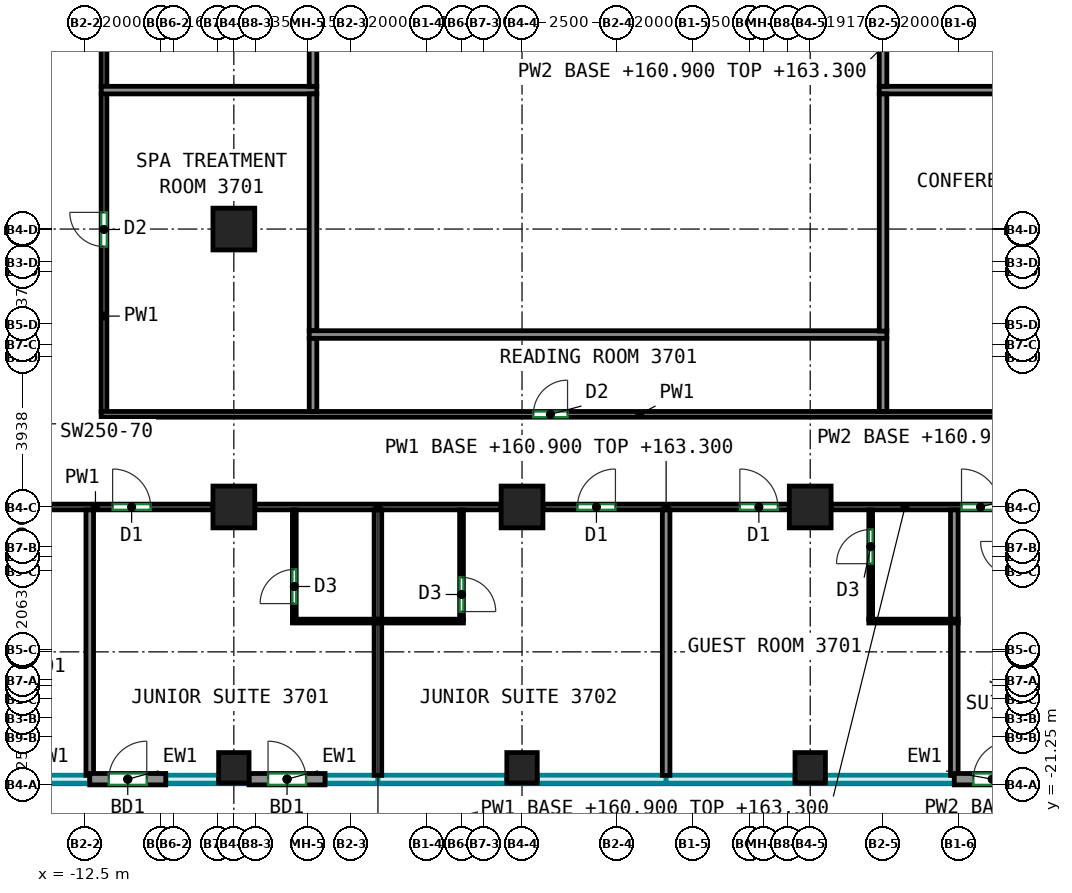
"""IFC4 building model, lengths in metres.
Left out: names, types, materials, properties, quantities, classifications, styles, units other than length and angle.
Written with IfcOpenShell. Run it as: python <this file> out.ifc"""

import sys

from ifc_helpers import new_model, si_unit, direction, frame, frame_2d, origin, origin_2d, place, context, subcontext, project, spatial, rectangle, extrude, source, transform, mapped, element, fill, save


model = new_model("IFC4")
c1 = context("Model", 3, precision=1e-05, world=origin(), true_north=direction((0.0, 1.0)))
c2 = subcontext(c1, "Body", "Model", "MODEL_VIEW")
j1 = project(units=[si_unit("LENGTHUNIT", "METRE"), si_unit("PLANEANGLEUNIT", "RADIAN")], contexts=[c1])
p1 = place(None, origin())
s1 = spatial("IfcSite", under=j1, at=p1, CompositionType="ELEMENT")
p2 = place(p1, origin())
s2 = spatial("IfcBuilding", under=s1, at=p2, CompositionType="ELEMENT")
p3 = place(p2, frame((0.0, 0.0, 160.9)))
s3 = spatial("IfcBuildingStorey", under=s2, at=p3, CompositionType="ELEMENT", Elevation=160.9)
m1 = source(origin(), c2, "Body", "SweptSolid", [
    extrude(rectangle(XDim=0.8, YDim=0.8, at=origin_2d()), origin(), (0.0, 0.0, 1.0), 3.0),
])
p4 = place(p3, frame((-8.583, -20.8, 0.0), z_axis=(0.0, 0.0, 1.0), x_axis=(1.0, 0.0, 0.0)))
e1 = element("IfcColumn", 1, at=p4, inside=s3, PredefinedType="COLUMN", context=c2, shape_type="MappedRepresentation", body=[
    mapped(m1, transform((0.0, 0.0, 0.0))),
])
m2 = source(origin(), c2, "Body", "SweptSolid", [
    extrude(rectangle(XDim=1.1, YDim=1.1, at=origin_2d()), origin(), (0.0, 0.0, 1.0), 3.0),
])
for number, where, z_axis, x_axis in (
    (2, (-8.583, -13.938, 0.0), (0.0, 0.0, 1.0), (1.0, 0.0, 0.0)),
    (3, (-8.583, -6.625, 0.0), (0.0, 0.0, 1.0), (1.0, 0.0, 0.0)),
):
    element("IfcColumn", number, at=place(p3, frame(where, z_axis=z_axis, x_axis=x_axis)), inside=s3, PredefinedType="COLUMN", context=c2, shape_type="MappedRepresentation", body=[
        mapped(m2, transform((0.0, 0.0, 0.0))),
    ])
p5 = place(p3, frame((-1.0, -20.8, 0.0), z_axis=(0.0, 0.0, 1.0), x_axis=(1.0, 0.0, 0.0)))
e4 = element("IfcColumn", 4, at=p5, inside=s3, PredefinedType="COLUMN", context=c2, shape_type="MappedRepresentation", body=[
    mapped(m1, transform((0.0, 0.0, 0.0))),
])
p6 = place(p3, frame((-1.0, -13.938, 0.0), z_axis=(0.0, 0.0, 1.0), x_axis=(1.0, 0.0, 0.0)))
e5 = element("IfcColumn", 5, at=p6, inside=s3, PredefinedType="COLUMN", context=c2, shape_type="MappedRepresentation", body=[
    mapped(m2, transform((0.0, 0.0, 0.0))),
])
p7 = place(p3, frame((6.583, -20.8, 0.0), z_axis=(0.0, 0.0, 1.0), x_axis=(1.0, 0.0, 0.0)))
e6 = element("IfcColumn", 6, at=p7, inside=s3, PredefinedType="COLUMN", context=c2, shape_type="MappedRepresentation", body=[
    mapped(m1, transform((0.0, 0.0, 0.0))),
])
p8 = place(p3, frame((6.583, -13.938, 0.0), z_axis=(0.0, 0.0, 1.0), x_axis=(1.0, 0.0, 0.0)))
e7 = element("IfcColumn", 7, at=p8, inside=s3, PredefinedType="COLUMN", context=c2, shape_type="MappedRepresentation", body=[
    mapped(m2, transform((0.0, 0.0, 0.0))),
])
m3 = source(origin(), c2, "Body", "SweptSolid", [
    extrude(rectangle(XDim=2.0, YDim=0.3, at=frame_2d((1.0, 0.0))), origin(), (0.0, 0.0, 1.0), 3.0),
])
p9 = place(p3, frame((-12.375, -21.1, 0.0), z_axis=(0.0, 0.0, 1.0), x_axis=(1.0, 0.0, 0.0)))
e8 = element("IfcWall", 8, at=p9, inside=s3, PredefinedType="SOLIDWALL", context=c2, shape_type="MappedRepresentation", body=[
    mapped(m3, transform((0.0, 0.0, 0.0))),
])
p10 = place(p9, frame((0.5, 0.0, 0.0)))
e9 = element("IfcOpeningElement", 9, at=p10, cuts=e8, PredefinedType="OPENING", context=c2, shape_type="SweptSolid", body=[
    extrude(rectangle(XDim=1.0, YDim=2.1, at=frame_2d((0.5, 1.05))), frame((0.0, 0.16, 0.0), z_axis=(0.0, -1.0, 0.0), x_axis=(1.0, 0.0, 0.0)), (0.0, 0.0, 1.0), 0.32),
])
p11 = place(p3, frame((-8.183, -21.1, 0.0), z_axis=(0.0, 0.0, 1.0), x_axis=(1.0, 0.0, 0.0)))
e10 = element("IfcWall", 10, at=p11, inside=s3, PredefinedType="SOLIDWALL", context=c2, shape_type="MappedRepresentation", body=[
    mapped(m3, transform((0.0, 0.0, 0.0))),
])
p12 = place(p11, frame((0.5, 0.0, 0.0)))
e11 = element("IfcOpeningElement", 11, at=p12, cuts=e10, PredefinedType="OPENING", context=c2, shape_type="SweptSolid", body=[
    extrude(rectangle(XDim=1.0, YDim=2.1, at=frame_2d((0.5, 1.05))), frame((0.0, 0.16, 0.0), z_axis=(0.0, -1.0, 0.0), x_axis=(1.0, 0.0, 0.0)), (0.0, 0.0, 1.0), 0.32),
])
p13 = place(p3, frame((10.375, -21.1, 0.0), z_axis=(0.0, 0.0, 1.0), x_axis=(1.0, 0.0, 0.0)))
e12 = element("IfcWall", 12, at=p13, inside=s3, PredefinedType="SOLIDWALL", context=c2, shape_type="MappedRepresentation", body=[
    mapped(m3, transform((0.0, 0.0, 0.0))),
])
p14 = place(p13, frame((0.5, 0.0, 0.0)))
e13 = element("IfcOpeningElement", 13, at=p14, cuts=e12, PredefinedType="OPENING", context=c2, shape_type="SweptSolid", body=[
    extrude(rectangle(XDim=1.0, YDim=2.1, at=frame_2d((0.5, 1.05))), frame((0.0, 0.16, 0.0), z_axis=(0.0, -1.0, 0.0), x_axis=(1.0, 0.0, 0.0)), (0.0, 0.0, 1.0), 0.32),
])
p15 = place(p3, frame((-13.55, -13.938, 0.0), z_axis=(0.0, 0.0, 1.0), x_axis=(1.0, 0.0, 0.0)))
e14 = element("IfcWall", 14, at=p15, inside=s3, PredefinedType="PARTITIONING", context=c2, shape_type="SweptSolid", body=[
    extrude(rectangle(XDim=4.417, YDim=0.15, at=frame_2d((2.208, 0.0))), origin(), (0.0, 0.0, 1.0), 3.0),
])
p16 = place(p15, frame((1.777, 0.0, 0.0)))
e15 = element("IfcOpeningElement", 15, at=p16, cuts=e14, PredefinedType="OPENING", context=c2, shape_type="SweptSolid", body=[
    extrude(rectangle(XDim=1.0, YDim=2.1, at=frame_2d((0.5, 1.05))), frame((0.0, 0.085, 0.0), z_axis=(0.0, -1.0, 0.0), x_axis=(1.0, 0.0, 0.0)), (0.0, 0.0, 1.0), 0.17),
])
p17 = place(p3, frame((-8.033, -13.938, 0.0), z_axis=(0.0, 0.0, 1.0), x_axis=(1.0, 0.0, 0.0)))
e16 = element("IfcWall", 16, at=p17, inside=s3, PredefinedType="PARTITIONING", context=c2, shape_type="SweptSolid", body=[
    extrude(rectangle(XDim=6.483, YDim=0.15, at=frame_2d((3.241, 0.0))), origin(), (0.0, 0.0, 1.0), 2.4),
])
p18 = place(p3, frame((-0.45, -13.938, 0.0), z_axis=(0.0, 0.0, 1.0), x_axis=(1.0, 0.0, 0.0)))
e17 = element("IfcWall", 17, at=p18, inside=s3, PredefinedType="PARTITIONING", context=c2, shape_type="SweptSolid", body=[
    extrude(rectangle(XDim=6.483, YDim=0.15, at=frame_2d((3.241, 0.0))), origin(), (0.0, 0.0, 1.0), 2.4),
])
p19 = place(p18, frame((0.908, 0.0, 0.0)))
e18 = element("IfcOpeningElement", 18, at=p19, cuts=e17, PredefinedType="OPENING", context=c2, shape_type="SweptSolid", body=[
    extrude(rectangle(XDim=1.0, YDim=2.1, at=frame_2d((0.5, 1.05))), frame((0.0, 0.085, 0.0), z_axis=(0.0, -1.0, 0.0), x_axis=(1.0, 0.0, 0.0)), (0.0, 0.0, 1.0), 0.17),
])
p20 = place(p18, frame((5.182, 0.0, 0.0)))
e19 = element("IfcOpeningElement", 19, at=p20, cuts=e17, PredefinedType="OPENING", context=c2, shape_type="SweptSolid", body=[
    extrude(rectangle(XDim=1.0, YDim=2.1, at=frame_2d((0.5, 1.05))), frame((0.0, 0.085, 0.0), z_axis=(0.0, -1.0, 0.0), x_axis=(1.0, 0.0, 0.0)), (0.0, 0.0, 1.0), 0.17),
])
p21 = place(p3, frame((7.133, -13.938, 0.0), z_axis=(0.0, 0.0, 1.0), x_axis=(1.0, 0.0, 0.0)))
e20 = element("IfcWall", 20, at=p21, inside=s3, PredefinedType="PARTITIONING", context=c2, shape_type="SweptSolid", body=[
    extrude(rectangle(XDim=6.484, YDim=0.15, at=frame_2d((3.242, 0.0))), origin(), (0.0, 0.0, 1.0), 2.4),
])
p22 = place(p21, frame((3.432, 0.0, 0.0)))
e21 = element("IfcOpeningElement", 21, at=p22, cuts=e20, PredefinedType="OPENING", context=c2, shape_type="SweptSolid", body=[
    extrude(rectangle(XDim=1.0, YDim=2.1, at=frame_2d((0.5, 1.05))), frame((0.0, 0.085, 0.0), z_axis=(0.0, -1.0, 0.0), x_axis=(1.0, 0.0, 0.0)), (0.0, 0.0, 1.0), 0.17),
])
p23 = place(p3, frame((-12.0, -11.425, 0.0), z_axis=(0.0, 0.0, 1.0), x_axis=(0.0, 1.0, 0.0)))
e22 = element("IfcWall", 22, at=p23, inside=s3, PredefinedType="PARTITIONING", context=c2, shape_type="SweptSolid", body=[
    extrude(rectangle(XDim=8.366, YDim=0.15, at=frame_2d((4.183, 0.0))), origin(), (0.0, 0.0, 1.0), 3.0),
])
p24 = place(p23, frame((4.339, 0.0, 0.0)))
e23 = element("IfcOpeningElement", 23, at=p24, cuts=e22, PredefinedType="OPENING", context=c2, shape_type="SweptSolid", body=[
    extrude(rectangle(XDim=0.9, YDim=2.1, at=frame_2d((0.45, 1.05))), frame((0.0, 0.085, 0.0), z_axis=(0.0, -1.0, 0.0), x_axis=(1.0, 0.0, 0.0)), (0.0, 0.0, 1.0), 0.17),
])
p25 = place(p3, frame((-12.075, -11.5, 0.0), z_axis=(0.0, 0.0, 1.0), x_axis=(1.0, 0.0, 0.0)))
e24 = element("IfcWall", 24, at=p25, inside=s3, PredefinedType="PARTITIONING", context=c2, shape_type="SweptSolid", body=[
    extrude(rectangle(XDim=28.35, YDim=0.15, at=frame_2d((14.175, 0.0))), origin(), (0.0, 0.0, 1.0), 3.0),
])
p26 = place(p25, frame((11.373, 0.0, 0.0)))
e25 = element("IfcOpeningElement", 25, at=p26, cuts=e24, PredefinedType="OPENING", context=c2, shape_type="SweptSolid", body=[
    extrude(rectangle(XDim=0.9, YDim=2.1, at=frame_2d((0.45, 1.05))), frame((0.0, 0.085, 0.0), z_axis=(0.0, -1.0, 0.0), x_axis=(1.0, 0.0, 0.0)), (0.0, 0.0, 1.0), 0.17),
])
p27 = place(p3, frame((-12.0, -2.879, 0.0), z_axis=(0.0, 0.0, 1.0), x_axis=(0.0, 1.0, 0.0)))
e26 = element("IfcWall", 26, at=p27, inside=s3, PredefinedType="PARTITIONING", context=c2, shape_type="SweptSolid", body=[
    extrude(rectangle(XDim=6.004, YDim=0.15, at=frame_2d((3.002, 0.0))), origin(), (0.0, 0.0, 1.0), 3.0),
])
p28 = place(p27, frame((3.102, 0.0, 0.0)))
e27 = element("IfcOpeningElement", 27, at=p28, cuts=e26, PredefinedType="OPENING", context=c2, shape_type="SweptSolid", body=[
    extrude(rectangle(XDim=0.9, YDim=2.1, at=frame_2d((0.45, 1.05))), frame((0.0, 0.085, 0.0), z_axis=(0.0, -1.0, 0.0), x_axis=(1.0, 0.0, 0.0)), (0.0, 0.0, 1.0), 0.17),
])
p29 = place(p3, frame((-12.375, -21.0, 0.0), z_axis=(0.0, 0.0, 1.0), x_axis=(0.0, 1.0, 0.0)))
e28 = element("IfcWall", 28, at=p29, inside=s3, PredefinedType="PARTITIONING", context=c2, shape_type="SweptSolid", body=[
    extrude(rectangle(XDim=6.985, YDim=0.2, at=frame_2d((3.493, 0.0))), origin(), (0.0, 0.0, 1.0), 3.0),
])
p30 = place(p3, frame((-6.992, -16.89, 0.0), z_axis=(0.0, 0.0, 1.0), x_axis=(0.0, 1.0, 0.0)))
e29 = element("IfcWall", 29, at=p30, inside=s3, PredefinedType="PARTITIONING", context=c2, shape_type="SweptSolid", body=[
    extrude(rectangle(XDim=2.875, YDim=0.1, at=frame_2d((1.438, 0.0))), origin(), (0.0, 0.0, 1.0), 3.0),
])
p31 = place(p30, frame((0.41, 0.0, 0.0)))
e30 = element("IfcOpeningElement", 30, at=p31, cuts=e29, PredefinedType="OPENING", context=c2, shape_type="SweptSolid", body=[
    extrude(rectangle(XDim=0.9, YDim=2.1, at=frame_2d((0.45, 1.05))), frame((0.0, 0.06, 0.0), z_axis=(0.0, -1.0, 0.0), x_axis=(1.0, 0.0, 0.0)), (0.0, 0.0, 1.0), 0.12),
])
p32 = place(p3, frame((-7.042, -16.94, 0.0), z_axis=(0.0, 0.0, 1.0), x_axis=(1.0, 0.0, 0.0)))
e31 = element("IfcWall", 31, at=p32, inside=s3, PredefinedType="PARTITIONING", context=c2, shape_type="SweptSolid", body=[
    extrude(rectangle(XDim=4.5, YDim=0.1, at=frame_2d((2.25, 0.0))), origin(), (0.0, 0.0, 1.0), 3.0),
])
p33 = place(p3, frame((-4.792, -21.0, 0.0), z_axis=(0.0, 0.0, 1.0), x_axis=(0.0, 1.0, 0.0)))
e32 = element("IfcWall", 32, at=p33, inside=s3, PredefinedType="PARTITIONING", context=c2, shape_type="SweptSolid", body=[
    extrude(rectangle(XDim=4.01, YDim=0.2, at=frame_2d((2.005, 0.0))), origin(), (0.0, 0.0, 1.0), 3.0),
])
p34 = place(p3, frame((-4.792, -16.89, 0.0), z_axis=(0.0, 0.0, 1.0), x_axis=(0.0, 1.0, 0.0)))
e33 = element("IfcWall", 33, at=p34, inside=s3, PredefinedType="PARTITIONING", context=c2, shape_type="SweptSolid", body=[
    extrude(rectangle(XDim=2.875, YDim=0.2, at=frame_2d((1.438, 0.0))), origin(), (0.0, 0.0, 1.0), 3.0),
])
p35 = place(p3, frame((-2.592, -14.015, 0.0), z_axis=(0.0, 0.0, 1.0), x_axis=(0.0, -1.0, 0.0)))
e34 = element("IfcWall", 34, at=p35, inside=s3, PredefinedType="PARTITIONING", context=c2, shape_type="SweptSolid", body=[
    extrude(rectangle(XDim=2.875, YDim=0.1, at=frame_2d((1.438, 0.0))), origin(), (0.0, 0.0, 1.0), 3.0),
])
p36 = place(p35, frame((1.775, 0.0, 0.0)))
e35 = element("IfcOpeningElement", 35, at=p36, cuts=e34, PredefinedType="OPENING", context=c2, shape_type="SweptSolid", body=[
    extrude(rectangle(XDim=0.9, YDim=2.1, at=frame_2d((0.45, 1.05))), frame((0.0, 0.06, 0.0), z_axis=(0.0, -1.0, 0.0), x_axis=(1.0, 0.0, 0.0)), (0.0, 0.0, 1.0), 0.12),
])
p37 = place(p3, frame((2.792, -21.0, 0.0), z_axis=(0.0, 0.0, 1.0), x_axis=(0.0, 1.0, 0.0)))
e36 = element("IfcWall", 36, at=p37, inside=s3, PredefinedType="PARTITIONING", context=c2, shape_type="SweptSolid", body=[
    extrude(rectangle(XDim=6.985, YDim=0.2, at=frame_2d((3.493, 0.0))), origin(), (0.0, 0.0, 1.0), 3.0),
])
p38 = place(p3, frame((8.175, -16.89, 0.0), z_axis=(0.0, 0.0, 1.0), x_axis=(0.0, 1.0, 0.0)))
e37 = element("IfcWall", 37, at=p38, inside=s3, PredefinedType="PARTITIONING", context=c2, shape_type="SweptSolid", body=[
    extrude(rectangle(XDim=2.875, YDim=0.1, at=frame_2d((1.438, 0.0))), origin(), (0.0, 0.0, 1.0), 3.0),
])
p39 = place(p38, frame((1.46, 0.0, 0.0)))
e38 = element("IfcOpeningElement", 38, at=p39, cuts=e37, PredefinedType="OPENING", context=c2, shape_type="SweptSolid", body=[
    extrude(rectangle(XDim=0.9, YDim=2.1, at=frame_2d((0.45, 1.05))), frame((0.0, 0.06, 0.0), z_axis=(0.0, -1.0, 0.0), x_axis=(1.0, 0.0, 0.0)), (0.0, 0.0, 1.0), 0.12),
])
p40 = place(p3, frame((8.125, -16.94, 0.0), z_axis=(0.0, 0.0, 1.0), x_axis=(1.0, 0.0, 0.0)))
e39 = element("IfcWall", 39, at=p40, inside=s3, PredefinedType="PARTITIONING", context=c2, shape_type="SweptSolid", body=[
    extrude(rectangle(XDim=2.35, YDim=0.1, at=frame_2d((1.175, 0.0))), origin(), (0.0, 0.0, 1.0), 3.0),
])
p41 = place(p3, frame((10.375, -21.0, 0.0), z_axis=(0.0, 0.0, 1.0), x_axis=(0.0, 1.0, 0.0)))
e40 = element("IfcWall", 40, at=p41, inside=s3, PredefinedType="PARTITIONING", context=c2, shape_type="SweptSolid", body=[
    extrude(rectangle(XDim=4.01, YDim=0.2, at=frame_2d((2.005, 0.0))), origin(), (0.0, 0.0, 1.0), 3.0),
])
p42 = place(p3, frame((10.375, -16.89, 0.0), z_axis=(0.0, 0.0, 1.0), x_axis=(0.0, 1.0, 0.0)))
e41 = element("IfcWall", 41, at=p42, inside=s3, PredefinedType="PARTITIONING", context=c2, shape_type="SweptSolid", body=[
    extrude(rectangle(XDim=2.875, YDim=0.2, at=frame_2d((1.438, 0.0))), origin(), (0.0, 0.0, 1.0), 3.0),
])
p43 = place(p3, frame((-12.073, -2.969, 0.0), z_axis=(0.0, 0.0, 1.0), x_axis=(1.0, 0.0, 0.0)))
e42 = element("IfcWall", 42, at=p43, inside=s3, PredefinedType="PARTITIONING", context=c2, shape_type="SweptSolid", body=[
    extrude(rectangle(XDim=5.673, YDim=0.2, at=frame_2d((2.836, 0.0))), origin(), (0.0, 0.0, 1.0), 3.0),
])
p44 = place(p3, frame((-6.5, -11.423, 0.0), z_axis=(0.0, 0.0, 1.0), x_axis=(0.0, 1.0, 0.0)))
e43 = element("IfcWall", 43, at=p44, inside=s3, PredefinedType="PARTITIONING", context=c2, shape_type="SweptSolid", body=[
    extrude(rectangle(XDim=1.923, YDim=0.2, at=frame_2d((0.961, 0.0))), origin(), (0.0, 0.0, 1.0), 3.0),
])
p45 = place(p3, frame((-6.5, -9.3, 0.0), z_axis=(0.0, 0.0, 1.0), x_axis=(0.0, 1.0, 0.0)))
e44 = element("IfcWall", 44, at=p45, inside=s3, PredefinedType="PARTITIONING", context=c2, shape_type="SweptSolid", body=[
    extrude(rectangle(XDim=6.231, YDim=0.2, at=frame_2d((3.115, 0.0))), origin(), (0.0, 0.0, 1.0), 3.0),
])
p46 = place(p3, frame((-6.5, -2.869, 0.0), z_axis=(0.0, 0.0, 1.0), x_axis=(0.0, 1.0, 0.0)))
e45 = element("IfcWall", 45, at=p46, inside=s3, PredefinedType="PARTITIONING", context=c2, shape_type="SweptSolid", body=[
    extrude(rectangle(XDim=5.992, YDim=0.2, at=frame_2d((2.996, 0.0))), origin(), (0.0, 0.0, 1.0), 3.0),
])
p47 = place(p3, frame((8.5, -11.423, 0.0), z_axis=(0.0, 0.0, 1.0), x_axis=(0.0, 1.0, 0.0)))
e46 = element("IfcWall", 46, at=p47, inside=s3, PredefinedType="PARTITIONING", context=c2, shape_type="SweptSolid", body=[
    extrude(rectangle(XDim=1.923, YDim=0.2, at=frame_2d((0.961, 0.0))), origin(), (0.0, 0.0, 1.0), 3.0),
])
p48 = place(p3, frame((8.6, -9.4, 0.0), z_axis=(0.0, 0.0, 1.0), x_axis=(-1.0, 0.0, 0.0)))
e47 = element("IfcWall", 47, at=p48, inside=s3, PredefinedType="PARTITIONING", context=c2, shape_type="SweptSolid", body=[
    extrude(rectangle(XDim=15.2, YDim=0.2, at=frame_2d((7.6, 0.0))), origin(), (0.0, 0.0, 1.0), 3.0),
])
p49 = place(p3, frame((8.4, -2.969, 0.0), z_axis=(0.0, 0.0, 1.0), x_axis=(1.0, 0.0, 0.0)))
e48 = element("IfcWall", 48, at=p49, inside=s3, PredefinedType="PARTITIONING", context=c2, shape_type="SweptSolid", body=[
    extrude(rectangle(XDim=7.873, YDim=0.2, at=frame_2d((3.937, 0.0))), origin(), (0.0, 0.0, 1.0), 3.0),
])
p50 = place(p3, frame((8.5, -9.31, 0.0), z_axis=(0.0, 0.0, 1.0), x_axis=(0.0, 1.0, 0.0)))
e49 = element("IfcWall", 49, at=p50, inside=s3, PredefinedType="PARTITIONING", context=c2, shape_type="SweptSolid", body=[
    extrude(rectangle(XDim=6.241, YDim=0.2, at=frame_2d((3.121, 0.0))), origin(), (0.0, 0.0, 1.0), 3.0),
])
p51 = place(p3, frame((8.5, -2.869, 0.0), z_axis=(0.0, 0.0, 1.0), x_axis=(0.0, 1.0, 0.0)))
e50 = element("IfcWall", 50, at=p51, inside=s3, PredefinedType="PARTITIONING", context=c2, shape_type="SweptSolid", body=[
    extrude(rectangle(XDim=3.457, YDim=0.2, at=frame_2d((1.729, 0.0))), origin(), (0.0, 0.0, 1.0), 3.0),
])
p52 = place(p10, origin())
e51 = element("IfcDoor", 51, at=p52, inside=s3, OperationType="SINGLE_SWING_RIGHT", PredefinedType="DOOR", context=c2, shape_type="SweptSolid", body=[
    extrude(rectangle(XDim=1.0, YDim=2.1, at=frame_2d((0.5, 1.05))), frame((0.0, 0.025, 0.0), z_axis=(0.0, -1.0, 0.0), x_axis=(1.0, 0.0, 0.0)), (0.0, 0.0, 1.0), 0.05),
])
fill(e9, e51)
p53 = place(p12, origin())
e52 = element("IfcDoor", 52, at=p53, inside=s3, OperationType="SINGLE_SWING_LEFT", PredefinedType="DOOR", context=c2, shape_type="SweptSolid", body=[
    extrude(rectangle(XDim=1.0, YDim=2.1, at=frame_2d((0.5, 1.05))), frame((0.0, 0.025, 0.0), z_axis=(0.0, -1.0, 0.0), x_axis=(1.0, 0.0, 0.0)), (0.0, 0.0, 1.0), 0.05),
])
fill(e11, e52)
p54 = place(p14, origin())
e53 = element("IfcDoor", 53, at=p54, inside=s3, OperationType="SINGLE_SWING_RIGHT", PredefinedType="DOOR", context=c2, shape_type="SweptSolid", body=[
    extrude(rectangle(XDim=1.0, YDim=2.1, at=frame_2d((0.5, 1.05))), frame((0.0, 0.025, 0.0), z_axis=(0.0, -1.0, 0.0), x_axis=(1.0, 0.0, 0.0)), (0.0, 0.0, 1.0), 0.05),
])
fill(e13, e53)
p55 = place(p36, origin())
e54 = element("IfcDoor", 54, at=p55, inside=s3, OperationType="SINGLE_SWING_RIGHT", PredefinedType="DOOR", context=c2, shape_type="SweptSolid", body=[
    extrude(rectangle(XDim=0.9, YDim=2.1, at=frame_2d((0.45, 1.05))), frame((0.0, 0.025, 0.0), z_axis=(0.0, -1.0, 0.0), x_axis=(1.0, 0.0, 0.0)), (0.0, 0.0, 1.0), 0.05),
])
fill(e35, e54)
p56 = place(p31, origin())
e55 = element("IfcDoor", 55, at=p56, inside=s3, OperationType="SINGLE_SWING_LEFT", PredefinedType="DOOR", context=c2, shape_type="SweptSolid", body=[
    extrude(rectangle(XDim=0.9, YDim=2.1, at=frame_2d((0.45, 1.05))), frame((0.0, 0.025, 0.0), z_axis=(0.0, -1.0, 0.0), x_axis=(1.0, 0.0, 0.0)), (0.0, 0.0, 1.0), 0.05),
])
fill(e30, e55)
p57 = place(p39, origin())
e56 = element("IfcDoor", 56, at=p57, inside=s3, OperationType="SINGLE_SWING_LEFT", PredefinedType="DOOR", context=c2, shape_type="SweptSolid", body=[
    extrude(rectangle(XDim=0.9, YDim=2.1, at=frame_2d((0.45, 1.05))), frame((0.0, 0.025, 0.0), z_axis=(0.0, -1.0, 0.0), x_axis=(1.0, 0.0, 0.0)), (0.0, 0.0, 1.0), 0.05),
])
fill(e38, e56)
p58 = place(p16, origin())
e57 = element("IfcDoor", 57, at=p58, inside=s3, OperationType="SINGLE_SWING_LEFT", PredefinedType="DOOR", context=c2, shape_type="SweptSolid", body=[
    extrude(rectangle(XDim=1.0, YDim=2.1, at=frame_2d((0.5, 1.05))), frame((0.0, 0.025, 0.0), z_axis=(0.0, -1.0, 0.0), x_axis=(1.0, 0.0, 0.0)), (0.0, 0.0, 1.0), 0.05),
])
fill(e15, e57)
p59 = place(p19, origin())
e58 = element("IfcDoor", 58, at=p59, inside=s3, OperationType="SINGLE_SWING_RIGHT", PredefinedType="DOOR", context=c2, shape_type="SweptSolid", body=[
    extrude(rectangle(XDim=1.0, YDim=2.1, at=frame_2d((0.5, 1.05))), frame((0.0, 0.025, 0.0), z_axis=(0.0, -1.0, 0.0), x_axis=(1.0, 0.0, 0.0)), (0.0, 0.0, 1.0), 0.05),
])
fill(e18, e58)
p60 = place(p20, origin())
e59 = element("IfcDoor", 59, at=p60, inside=s3, OperationType="SINGLE_SWING_LEFT", PredefinedType="DOOR", context=c2, shape_type="SweptSolid", body=[
    extrude(rectangle(XDim=1.0, YDim=2.1, at=frame_2d((0.5, 1.05))), frame((0.0, 0.025, 0.0), z_axis=(0.0, -1.0, 0.0), x_axis=(1.0, 0.0, 0.0)), (0.0, 0.0, 1.0), 0.05),
])
fill(e19, e59)
p61 = place(p22, origin())
e60 = element("IfcDoor", 60, at=p61, inside=s3, OperationType="SINGLE_SWING_LEFT", PredefinedType="DOOR", context=c2, shape_type="SweptSolid", body=[
    extrude(rectangle(XDim=1.0, YDim=2.1, at=frame_2d((0.5, 1.05))), frame((0.0, 0.025, 0.0), z_axis=(0.0, -1.0, 0.0), x_axis=(1.0, 0.0, 0.0)), (0.0, 0.0, 1.0), 0.05),
])
fill(e21, e60)
p62 = place(p26, origin())
e61 = element("IfcDoor", 61, at=p62, inside=s3, OperationType="SINGLE_SWING_RIGHT", PredefinedType="DOOR", context=c2, shape_type="SweptSolid", body=[
    extrude(rectangle(XDim=0.9, YDim=2.1, at=frame_2d((0.45, 1.05))), frame((0.0, 0.025, 0.0), z_axis=(0.0, -1.0, 0.0), x_axis=(1.0, 0.0, 0.0)), (0.0, 0.0, 1.0), 0.05),
])
fill(e25, e61)
p63 = place(p24, origin())
e62 = element("IfcDoor", 62, at=p63, inside=s3, OperationType="SINGLE_SWING_RIGHT", PredefinedType="DOOR", context=c2, shape_type="SweptSolid", body=[
    extrude(rectangle(XDim=0.9, YDim=2.1, at=frame_2d((0.45, 1.05))), frame((0.0, 0.025, 0.0), z_axis=(0.0, -1.0, 0.0), x_axis=(1.0, 0.0, 0.0)), (0.0, 0.0, 1.0), 0.05),
])
fill(e23, e62)
save(model, sys.argv[1])
